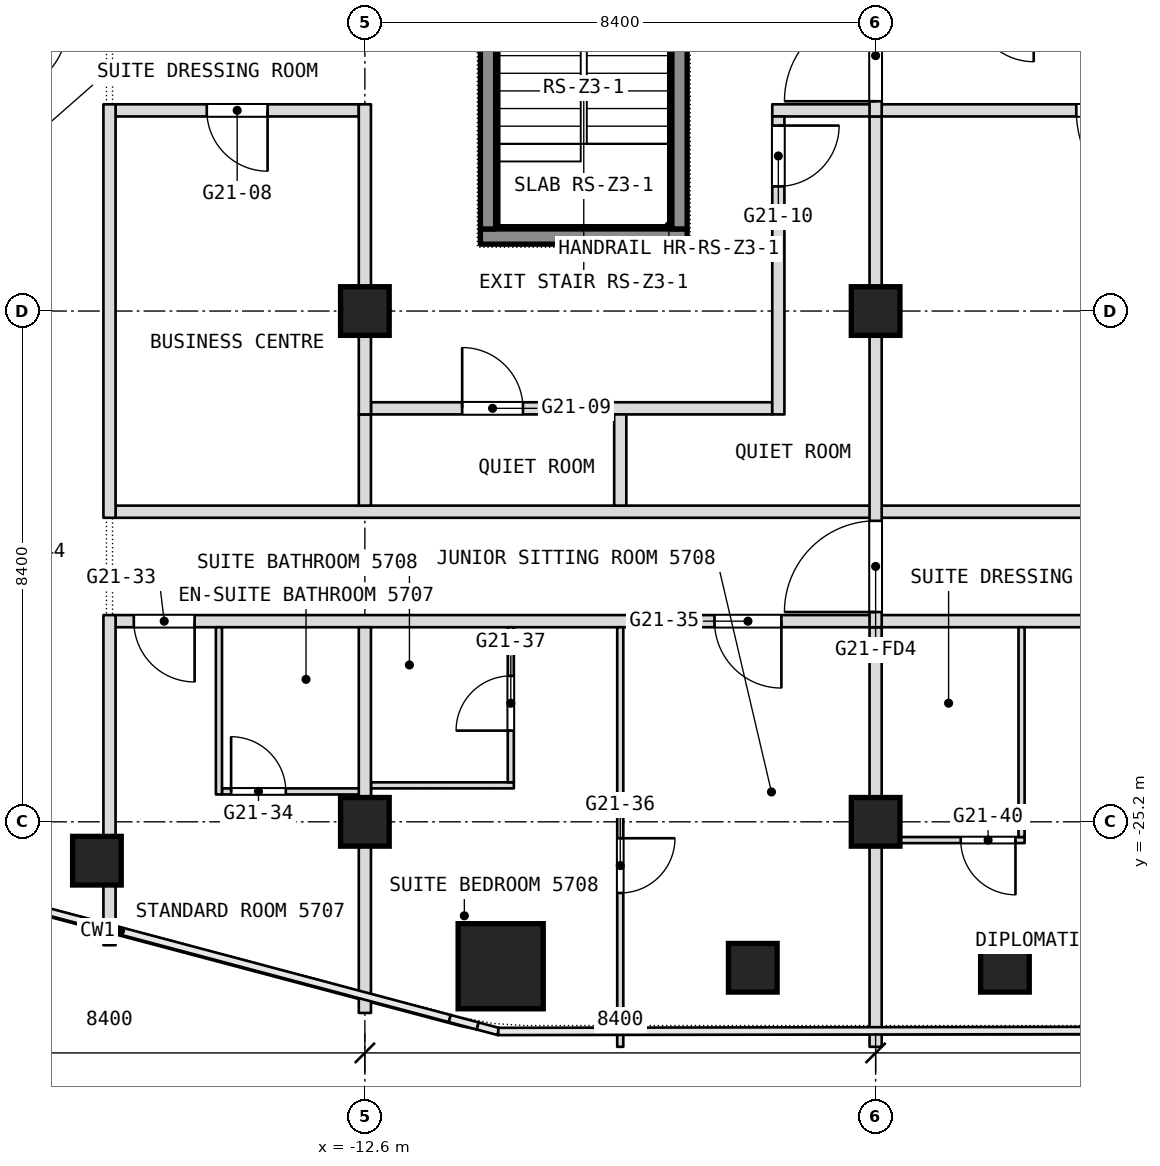
"""IFC4 building model, lengths in metres.
Left out: names, types, materials, properties, quantities, classifications, styles, units other than length and angle.
Written with IfcOpenShell. Run it as: python <this file> out.ifc"""

import sys

from ifc_helpers import new_model, si_unit, direction, frame, frame_2d, origin, origin_2d, place, context, subcontext, project, spatial, rectangle, extrude, element, fill, save


model = new_model("IFC4")
c1 = context("Model", 3, precision=1e-05, world=origin(), true_north=direction((0.0, 1.0)))
c2 = subcontext(c1, "Body", "Model", "MODEL_VIEW")
j1 = project(units=[si_unit("LENGTHUNIT", "METRE"), si_unit("PLANEANGLEUNIT", "RADIAN")], contexts=[c1])
p1 = place(None, origin())
s1 = spatial("IfcSite", under=j1, at=p1, CompositionType="ELEMENT")
p2 = place(p1, origin())
s2 = spatial("IfcBuilding", under=s1, at=p2, CompositionType="ELEMENT")
p3 = place(p2, frame((0.0, 0.0, 241.7)))
s3 = spatial("IfcBuildingStorey", under=s2, at=p3, CompositionType="ELEMENT", Elevation=241.7)
p4 = place(p3, frame((-10.366, -27.575, 0.0), z_axis=(0.0, 0.0, 1.0), x_axis=(1.0, 0.0, 0.0)))
e1 = element("IfcColumn", 1, at=p4, inside=s3, PredefinedType="COLUMN", context=c2, shape_type="SweptSolid", body=[
    extrude(rectangle(XDim=1.4, YDim=1.4, at=origin_2d()), origin(), (0.0, 0.0, 1.0), 3.6),
])
for number, where, z_axis, x_axis in (
    (2, (-12.6, -25.2, 0.0), (0.0, 0.0, 1.0), (1.0, 0.0, 0.0)),
    (3, (-12.6, -16.8, 0.0), (0.0, 0.0, 1.0), (1.0, 0.0, 0.0)),
    (4, (-4.2, -25.2, 0.0), (0.0, 0.0, 1.0), (1.0, 0.0, 0.0)),
    (5, (-4.2, -16.8, 0.0), (0.0, 0.0, 1.0), (1.0, 0.0, 0.0)),
    (6, (-2.073, -27.6, 0.0), (0.0, 0.0, 1.0), (1.0, 0.0, 0.0)),
    (7, (-6.22, -27.6, 0.0), (0.0, 0.0, 1.0), (1.0, 0.0, 0.0)),
    (8, (-17.007, -25.839, 0.0), (0.0, 0.0, 1.0), (1.0, 0.0, 0.0)),
):
    element("IfcColumn", number, at=place(p3, frame(where, z_axis=z_axis, x_axis=x_axis)), inside=s3, PredefinedType="COLUMN", context=c2, shape_type="SweptSolid", body=[
        extrude(rectangle(XDim=0.8, YDim=0.8, at=origin_2d()), origin(), (0.0, 0.0, 1.0), 3.6),
    ])
p5 = place(p3, frame((-4.1, -25.5, 0.0), z_axis=(0.0, 0.0, 1.0), x_axis=(1.0, 0.0, 0.0)))
e9 = element("IfcWall", 9, at=p5, inside=s3, PredefinedType="PARTITIONING", context=c2, shape_type="SweptSolid", body=[
    extrude(rectangle(XDim=2.35, YDim=0.1, at=frame_2d((1.175, 0.0))), origin(), (0.0, 0.0, 1.0), 3.34),
])
p6 = place(p5, frame((1.3, 0.0, 0.0)))
e10 = element("IfcOpeningElement", 10, at=p6, cuts=e9, PredefinedType="OPENING", context=c2, shape_type="SweptSolid", body=[
    extrude(rectangle(XDim=0.9, YDim=2.1, at=frame_2d((0.45, 1.05))), frame((0.0, 0.05, 0.0), z_axis=(0.0, -1.0, 0.0), x_axis=(1.0, 0.0, 0.0)), (0.0, 0.0, 1.0), 0.1),
])
p7 = place(p3, frame((-14.95, -24.7, 0.0), z_axis=(0.0, 0.0, 1.0), x_axis=(1.0, 0.0, 0.0)))
e11 = element("IfcWall", 11, at=p7, inside=s3, PredefinedType="PARTITIONING", context=c2, shape_type="SweptSolid", body=[
    extrude(rectangle(XDim=2.45, YDim=0.1, at=frame_2d((1.225, 0.0))), origin(), (0.0, 0.0, 1.0), 3.34),
])
p8 = place(p7, frame((0.15, 0.0, 0.0)))
e12 = element("IfcOpeningElement", 12, at=p8, cuts=e11, PredefinedType="OPENING", context=c2, shape_type="SweptSolid", body=[
    extrude(rectangle(XDim=0.9, YDim=2.1, at=frame_2d((0.45, 1.05))), frame((0.0, 0.05, 0.0), z_axis=(0.0, -1.0, 0.0), x_axis=(1.0, 0.0, 0.0)), (0.0, 0.0, 1.0), 0.1),
])
p9 = place(p3, frame((-12.5, -24.6, 0.0), z_axis=(0.0, 0.0, 1.0), x_axis=(1.0, 0.0, 0.0)))
e13 = element("IfcWall", 13, at=p9, inside=s3, PredefinedType="PARTITIONING", context=c2, shape_type="SweptSolid", body=[
    extrude(rectangle(XDim=2.35, YDim=0.1, at=frame_2d((1.175, 0.0))), origin(), (0.0, 0.0, 1.0), 3.34),
])
p10 = place(p3, frame((-16.7, -21.9, 0.0), z_axis=(0.0, 0.0, 1.0), x_axis=(1.0, 0.0, 0.0)))
e14 = element("IfcWall", 14, at=p10, inside=s3, PredefinedType="PARTITIONING", context=c2, shape_type="SweptSolid", body=[
    extrude(rectangle(XDim=33.4, YDim=0.2, at=frame_2d((16.7, 0.0))), origin(), (0.0, 0.0, 1.0), 3.34),
])
p11 = place(p10, frame((0.3, 0.0, 0.0)))
e15 = element("IfcOpeningElement", 15, at=p11, cuts=e14, PredefinedType="OPENING", context=c2, shape_type="SweptSolid", body=[
    extrude(rectangle(XDim=1.0, YDim=2.1, at=frame_2d((0.5, 1.05))), frame((0.0, 0.1, 0.0), z_axis=(0.0, -1.0, 0.0), x_axis=(1.0, 0.0, 0.0)), (0.0, 0.0, 1.0), 0.2),
])
p12 = place(p10, frame((9.85, 0.0, 0.0)))
e16 = element("IfcOpeningElement", 16, at=p12, cuts=e14, PredefinedType="OPENING", context=c2, shape_type="SweptSolid", body=[
    extrude(rectangle(XDim=1.1, YDim=2.1, at=frame_2d((0.55, 1.05))), frame((0.0, 0.1, 0.0), z_axis=(0.0, -1.0, 0.0), x_axis=(1.0, 0.0, 0.0)), (0.0, 0.0, 1.0), 0.2),
])
p13 = place(p10, frame((16.1, 0.0, 0.0)))
e17 = element("IfcOpeningElement", 17, at=p13, cuts=e14, PredefinedType="OPENING", context=c2, shape_type="SweptSolid", body=[
    extrude(rectangle(XDim=1.1, YDim=2.1, at=frame_2d((0.55, 1.05))), frame((0.0, 0.1, 0.0), z_axis=(0.0, -1.0, 0.0), x_axis=(1.0, 0.0, 0.0)), (0.0, 0.0, 1.0), 0.2),
])
p14 = place(p10, frame((24.2, 0.0, 0.0)))
e18 = element("IfcOpeningElement", 18, at=p14, cuts=e14, PredefinedType="OPENING", context=c2, shape_type="SweptSolid", body=[
    extrude(rectangle(XDim=1.8, YDim=2.1, at=frame_2d((0.9, 1.05))), frame((0.0, 0.1, 0.0), z_axis=(0.0, -1.0, 0.0), x_axis=(1.0, 0.0, 0.0)), (0.0, 0.0, 1.0), 0.2),
])
p15 = place(p10, frame((29.7, 0.0, 0.0)))
e19 = element("IfcOpeningElement", 19, at=p15, cuts=e14, PredefinedType="OPENING", context=c2, shape_type="SweptSolid", body=[
    extrude(rectangle(XDim=1.0, YDim=2.1, at=frame_2d((0.5, 1.05))), frame((0.0, 0.1, 0.0), z_axis=(0.0, -1.0, 0.0), x_axis=(1.0, 0.0, 0.0)), (0.0, 0.0, 1.0), 0.2),
])
p16 = place(p3, frame((-16.7, -20.1, 0.0), z_axis=(0.0, 0.0, 1.0), x_axis=(1.0, 0.0, 0.0)))
e20 = element("IfcWall", 20, at=p16, inside=s3, PredefinedType="PARTITIONING", context=c2, shape_type="SweptSolid", body=[
    extrude(rectangle(XDim=33.4, YDim=0.2, at=frame_2d((16.7, 0.0))), origin(), (0.0, 0.0, 1.0), 3.34),
])
p17 = place(p3, frame((-12.5, -18.4, 0.0), z_axis=(0.0, 0.0, 1.0), x_axis=(1.0, 0.0, 0.0)))
e21 = element("IfcWall", 21, at=p17, inside=s3, PredefinedType="PARTITIONING", context=c2, shape_type="SweptSolid", body=[
    extrude(rectangle(XDim=6.6, YDim=0.2, at=frame_2d((3.3, 0.0))), origin(), (0.0, 0.0, 1.0), 3.34),
])
p18 = place(p17, frame((1.5, 0.0, 0.0)))
e22 = element("IfcOpeningElement", 22, at=p18, cuts=e21, PredefinedType="OPENING", context=c2, shape_type="SweptSolid", body=[
    extrude(rectangle(XDim=1.0, YDim=2.1, at=frame_2d((0.5, 1.05))), frame((0.0, 0.1, 0.0), z_axis=(0.0, -1.0, 0.0), x_axis=(1.0, 0.0, 0.0)), (0.0, 0.0, 1.0), 0.2),
])
p19 = place(p3, frame((-16.7, -13.5, 0.0), z_axis=(0.0, 0.0, 1.0), x_axis=(1.0, 0.0, 0.0)))
e23 = element("IfcWall", 23, at=p19, inside=s3, PredefinedType="PARTITIONING", context=c2, shape_type="SweptSolid", body=[
    extrude(rectangle(XDim=4.0, YDim=0.2, at=frame_2d((2.0, 0.0))), origin(), (0.0, 0.0, 1.0), 3.34),
])
p20 = place(p19, frame((1.5, 0.0, 0.0)))
e24 = element("IfcOpeningElement", 24, at=p20, cuts=e23, PredefinedType="OPENING", context=c2, shape_type="SweptSolid", body=[
    extrude(rectangle(XDim=1.0, YDim=2.1, at=frame_2d((0.5, 1.05))), frame((0.0, 0.1, 0.0), z_axis=(0.0, -1.0, 0.0), x_axis=(1.0, 0.0, 0.0)), (0.0, 0.0, 1.0), 0.2),
])
p21 = place(p3, frame((-5.9, -13.5, 0.0), z_axis=(0.0, 0.0, 1.0), x_axis=(1.0, 0.0, 0.0)))
e25 = element("IfcWall", 25, at=p21, inside=s3, PredefinedType="PARTITIONING", context=c2, shape_type="SweptSolid", body=[
    extrude(rectangle(XDim=11.6, YDim=0.2, at=frame_2d((5.8, 0.0))), origin(), (0.0, 0.0, 1.0), 3.34),
])
p22 = place(p21, frame((5.0, 0.0, 0.0)))
e26 = element("IfcOpeningElement", 26, at=p22, cuts=e25, PredefinedType="OPENING", context=c2, shape_type="SweptSolid", body=[
    extrude(rectangle(XDim=1.8, YDim=2.1, at=frame_2d((0.9, 1.05))), frame((0.0, 0.1, 0.0), z_axis=(0.0, -1.0, 0.0), x_axis=(1.0, 0.0, 0.0)), (0.0, 0.0, 1.0), 0.2),
])
p23 = place(p3, frame((-1.8, -25.45, 0.0), z_axis=(0.0, 0.0, 1.0), x_axis=(0.0, 1.0, 0.0)))
e27 = element("IfcWall", 27, at=p23, inside=s3, PredefinedType="PARTITIONING", context=c2, shape_type="SweptSolid", body=[
    extrude(rectangle(XDim=3.45, YDim=0.1, at=frame_2d((1.725, 0.0))), origin(), (0.0, 0.0, 1.0), 3.34),
])
p24 = place(p3, frame((-4.2, -28.9, 0.0), z_axis=(0.0, 0.0, 1.0), x_axis=(0.0, 1.0, 0.0)))
e28 = element("IfcWall", 28, at=p24, inside=s3, PredefinedType="PARTITIONING", context=c2, shape_type="SweptSolid", body=[
    extrude(rectangle(XDim=6.9, YDim=0.2, at=frame_2d((3.45, 0.0))), origin(), (0.0, 0.0, 1.0), 3.34),
])
p25 = place(p3, frame((-4.2, -22.0, 0.0), z_axis=(0.0, 0.0, 1.0), x_axis=(0.0, 1.0, 0.0)))
e29 = element("IfcWall", 29, at=p25, inside=s3, PredefinedType="PARTITIONING", context=c2, shape_type="SweptSolid", body=[
    extrude(rectangle(XDim=8.4, YDim=0.2, at=frame_2d((4.2, 0.0))), origin(), (0.0, 0.0, 1.0), 3.34),
])
p26 = place(p25, frame((0.25, 0.0, 0.0)))
e30 = element("IfcOpeningElement", 30, at=p26, cuts=e29, PredefinedType="OPENING", context=c2, shape_type="SweptSolid", body=[
    extrude(rectangle(XDim=1.5, YDim=2.1, at=frame_2d((0.75, 1.05))), frame((0.0, 0.1, 0.0), z_axis=(0.0, -1.0, 0.0), x_axis=(1.0, 0.0, 0.0)), (0.0, 0.0, 1.0), 0.2),
])
p27 = place(p3, frame((-4.2, -13.6, 0.0), z_axis=(0.0, 0.0, 1.0), x_axis=(0.0, 1.0, 0.0)))
e31 = element("IfcWall", 31, at=p27, inside=s3, PredefinedType="PARTITIONING", context=c2, shape_type="SweptSolid", body=[
    extrude(rectangle(XDim=13.6, YDim=0.2, at=frame_2d((6.8, 0.0))), origin(), (0.0, 0.0, 1.0), 3.34),
])
p28 = place(p27, frame((11.95, 0.0, 0.0)))
e32 = element("IfcOpeningElement", 32, at=p28, cuts=e31, PredefinedType="OPENING", context=c2, shape_type="SweptSolid", body=[
    extrude(rectangle(XDim=1.5, YDim=2.1, at=frame_2d((0.75, 1.05))), frame((0.0, 0.1, 0.0), z_axis=(0.0, -1.0, 0.0), x_axis=(1.0, 0.0, 0.0)), (0.0, 0.0, 1.0), 0.2),
])
p29 = place(p27, frame((0.25, 0.0, 0.0)))
e33 = element("IfcOpeningElement", 33, at=p29, cuts=e31, PredefinedType="OPENING", context=c2, shape_type="SweptSolid", body=[
    extrude(rectangle(XDim=1.5, YDim=2.1, at=frame_2d((0.75, 1.05))), frame((0.0, 0.1, 0.0), z_axis=(0.0, -1.0, 0.0), x_axis=(1.0, 0.0, 0.0)), (0.0, 0.0, 1.0), 0.2),
])
p30 = place(p3, frame((-5.8, -18.5, 0.0), z_axis=(0.0, 0.0, 1.0), x_axis=(0.0, 1.0, 0.0)))
e34 = element("IfcWall", 34, at=p30, inside=s3, PredefinedType="PARTITIONING", context=c2, shape_type="SweptSolid", body=[
    extrude(rectangle(XDim=4.9, YDim=0.2, at=frame_2d((2.45, 0.0))), origin(), (0.0, 0.0, 1.0), 3.34),
])
p31 = place(p30, frame((3.75, 0.0, 0.0)))
e35 = element("IfcOpeningElement", 35, at=p31, cuts=e34, PredefinedType="OPENING", context=c2, shape_type="SweptSolid", body=[
    extrude(rectangle(XDim=1.0, YDim=2.1, at=frame_2d((0.5, 1.05))), frame((0.0, 0.1, 0.0), z_axis=(0.0, -1.0, 0.0), x_axis=(1.0, 0.0, 0.0)), (0.0, 0.0, 1.0), 0.2),
])
p32 = place(p3, frame((-8.4, -28.9, 0.0), z_axis=(0.0, 0.0, 1.0), x_axis=(0.0, 1.0, 0.0)))
e36 = element("IfcWall", 36, at=p32, inside=s3, PredefinedType="PARTITIONING", context=c2, shape_type="SweptSolid", body=[
    extrude(rectangle(XDim=6.9, YDim=0.1, at=frame_2d((3.45, 0.0))), origin(), (0.0, 0.0, 1.0), 3.34),
])
p33 = place(p32, frame((2.53, 0.0, 0.0)))
e37 = element("IfcOpeningElement", 37, at=p33, cuts=e36, PredefinedType="OPENING", context=c2, shape_type="SweptSolid", body=[
    extrude(rectangle(XDim=0.9, YDim=2.1, at=frame_2d((0.45, 1.05))), frame((0.0, 0.05, 0.0), z_axis=(0.0, -1.0, 0.0), x_axis=(1.0, 0.0, 0.0)), (0.0, 0.0, 1.0), 0.1),
])
p34 = place(p3, frame((-8.4, -20.0, 0.0), z_axis=(0.0, 0.0, 1.0), x_axis=(0.0, 1.0, 0.0)))
e38 = element("IfcWall", 38, at=p34, inside=s3, PredefinedType="PARTITIONING", context=c2, shape_type="SweptSolid", body=[
    extrude(rectangle(XDim=1.5, YDim=0.2, at=frame_2d((0.75, 0.0))), origin(), (0.0, 0.0, 1.0), 3.34),
])
p35 = place(p3, frame((-10.2, -24.55, 0.0), z_axis=(0.0, 0.0, 1.0), x_axis=(0.0, 1.0, 0.0)))
e39 = element("IfcWall", 39, at=p35, inside=s3, PredefinedType="PARTITIONING", context=c2, shape_type="SweptSolid", body=[
    extrude(rectangle(XDim=2.55, YDim=0.1, at=frame_2d((1.275, 0.0))), origin(), (0.0, 0.0, 1.0), 3.34),
])
p36 = place(p35, frame((0.85, 0.0, 0.0)))
e40 = element("IfcOpeningElement", 40, at=p36, cuts=e39, PredefinedType="OPENING", context=c2, shape_type="SweptSolid", body=[
    extrude(rectangle(XDim=0.9, YDim=2.1, at=frame_2d((0.45, 1.05))), frame((0.0, 0.05, 0.0), z_axis=(0.0, -1.0, 0.0), x_axis=(1.0, 0.0, 0.0)), (0.0, 0.0, 1.0), 0.1),
])
p37 = place(p3, frame((-12.6, -28.343, 0.0), z_axis=(0.0, 0.0, 1.0), x_axis=(0.0, 1.0, 0.0)))
e41 = element("IfcWall", 41, at=p37, inside=s3, PredefinedType="PARTITIONING", context=c2, shape_type="SweptSolid", body=[
    extrude(rectangle(XDim=6.343, YDim=0.2, at=frame_2d((3.171, 0.0))), origin(), (0.0, 0.0, 1.0), 3.34),
])
p38 = place(p3, frame((-12.6, -20.0, 0.0), z_axis=(0.0, 0.0, 1.0), x_axis=(0.0, 1.0, 0.0)))
e42 = element("IfcWall", 42, at=p38, inside=s3, PredefinedType="PARTITIONING", context=c2, shape_type="SweptSolid", body=[
    extrude(rectangle(XDim=1.5, YDim=0.2, at=frame_2d((0.75, 0.0))), origin(), (0.0, 0.0, 1.0), 3.34),
])
p39 = place(p3, frame((-12.6, -18.5, 0.0), z_axis=(0.0, 0.0, 1.0), x_axis=(0.0, 1.0, 0.0)))
e43 = element("IfcWall", 43, at=p39, inside=s3, PredefinedType="PARTITIONING", context=c2, shape_type="SweptSolid", body=[
    extrude(rectangle(XDim=5.1, YDim=0.2, at=frame_2d((2.55, 0.0))), origin(), (0.0, 0.0, 1.0), 3.34),
])
p40 = place(p3, frame((-15.0, -24.75, 0.0), z_axis=(0.0, 0.0, 1.0), x_axis=(0.0, 1.0, 0.0)))
e44 = element("IfcWall", 44, at=p40, inside=s3, PredefinedType="PARTITIONING", context=c2, shape_type="SweptSolid", body=[
    extrude(rectangle(XDim=2.75, YDim=0.1, at=frame_2d((1.375, 0.0))), origin(), (0.0, 0.0, 1.0), 3.34),
])
p41 = place(p3, frame((-16.8, -27.229, 0.0), z_axis=(0.0, 0.0, 1.0), x_axis=(0.0, 1.0, 0.0)))
e45 = element("IfcWall", 45, at=p41, inside=s3, PredefinedType="PARTITIONING", context=c2, shape_type="SweptSolid", body=[
    extrude(rectangle(XDim=5.429, YDim=0.2, at=frame_2d((2.714, 0.0))), origin(), (0.0, 0.0, 1.0), 3.34),
])
p42 = place(p3, frame((-16.8, -20.2, 0.0), z_axis=(0.0, 0.0, 1.0), x_axis=(0.0, 1.0, 0.0)))
e46 = element("IfcWall", 46, at=p42, inside=s3, PredefinedType="PARTITIONING", context=c2, shape_type="SweptSolid", body=[
    extrude(rectangle(XDim=6.8, YDim=0.2, at=frame_2d((3.4, 0.0))), origin(), (0.0, 0.0, 1.0), 3.34),
])
p43 = place(p3, frame((-10.7, -15.575, 0.1), z_axis=(0.0, 0.0, 1.0), x_axis=(1.0, 0.0, 0.0)))
e47 = element("IfcWall", 47, at=p43, inside=s3, PredefinedType="SHEAR", context=c2, shape_type="SweptSolid", body=[
    extrude(rectangle(XDim=3.4, YDim=0.25, at=frame_2d((1.7, 0.0))), origin(), (0.0, 0.0, 1.0), 3.6),
])
for number, where, z_axis, x_axis in (
    (48, (-10.575, -15.45, 0.1), (0.0, 0.0, 1.0), (0.0, 1.0, 0.0)),
    (49, (-7.425, -15.45, 0.1), (0.0, 0.0, 1.0), (0.0, 1.0, 0.0)),
):
    element("IfcWall", number, at=place(p3, frame(where, z_axis=z_axis, x_axis=x_axis)), inside=s3, PredefinedType="SHEAR", context=c2, shape_type="SweptSolid", body=[
        extrude(rectangle(XDim=5.7, YDim=0.25, at=frame_2d((2.85, 0.0))), origin(), (0.0, 0.0, 1.0), 3.6),
    ])
p44 = place(p6, origin())
e50 = element("IfcDoor", 50, at=p44, inside=s3, OperationType="SINGLE_SWING_RIGHT", PredefinedType="DOOR", context=c2, shape_type="SweptSolid", body=[
    extrude(rectangle(XDim=0.9, YDim=2.1, at=frame_2d((0.45, 1.05))), frame((0.0, 0.025, 0.0), z_axis=(0.0, -1.0, 0.0), x_axis=(1.0, 0.0, 0.0)), (0.0, 0.0, 1.0), 0.05),
])
fill(e10, e50)
p45 = place(p8, origin())
e51 = element("IfcDoor", 51, at=p45, inside=s3, OperationType="SINGLE_SWING_LEFT", PredefinedType="DOOR", context=c2, shape_type="SweptSolid", body=[
    extrude(rectangle(XDim=0.9, YDim=2.1, at=frame_2d((0.45, 1.05))), frame((0.0, 0.025, 0.0), z_axis=(0.0, -1.0, 0.0), x_axis=(1.0, 0.0, 0.0)), (0.0, 0.0, 1.0), 0.05),
])
fill(e12, e51)
p46 = place(p11, origin())
e52 = element("IfcDoor", 52, at=p46, inside=s3, OperationType="SINGLE_SWING_RIGHT", PredefinedType="DOOR", context=c2, shape_type="SweptSolid", body=[
    extrude(rectangle(XDim=1.0, YDim=2.1, at=frame_2d((0.5, 1.05))), frame((0.0, 0.025, 0.0), z_axis=(0.0, -1.0, 0.0), x_axis=(1.0, 0.0, 0.0)), (0.0, 0.0, 1.0), 0.05),
])
fill(e15, e52)
p47 = place(p12, origin())
e53 = element("IfcDoor", 53, at=p47, inside=s3, OperationType="SINGLE_SWING_LEFT", PredefinedType="DOOR", context=c2, shape_type="SweptSolid", body=[
    extrude(rectangle(XDim=1.1, YDim=2.1, at=frame_2d((0.55, 1.05))), frame((0.0, 0.025, 0.0), z_axis=(0.0, -1.0, 0.0), x_axis=(1.0, 0.0, 0.0)), (0.0, 0.0, 1.0), 0.05),
])
fill(e16, e53)
p48 = place(p18, origin())
e54 = element("IfcDoor", 54, at=p48, inside=s3, OperationType="SINGLE_SWING_RIGHT", PredefinedType="DOOR", context=c2, shape_type="SweptSolid", body=[
    extrude(rectangle(XDim=1.0, YDim=2.1, at=frame_2d((0.5, 1.05))), frame((0.0, 0.025, 0.0), z_axis=(0.0, -1.0, 0.0), x_axis=(1.0, 0.0, 0.0)), (0.0, 0.0, 1.0), 0.05),
])
fill(e22, e54)
p49 = place(p20, origin())
e55 = element("IfcDoor", 55, at=p49, inside=s3, OperationType="SINGLE_SWING_RIGHT", PredefinedType="DOOR", context=c2, shape_type="SweptSolid", body=[
    extrude(rectangle(XDim=1.0, YDim=2.1, at=frame_2d((0.5, 1.05))), frame((0.0, 0.025, 0.0), z_axis=(0.0, -1.0, 0.0), x_axis=(1.0, 0.0, 0.0)), (0.0, 0.0, 1.0), 0.05),
])
fill(e24, e55)
p50 = place(p22, origin())
e56 = element("IfcDoor", 56, at=p50, inside=s3, OperationType="DOUBLE_DOOR_SINGLE_SWING", PredefinedType="DOOR", context=c2, shape_type="SweptSolid", body=[
    extrude(rectangle(XDim=1.8, YDim=2.1, at=frame_2d((0.9, 1.05))), frame((0.0, 0.025, 0.0), z_axis=(0.0, -1.0, 0.0), x_axis=(1.0, 0.0, 0.0)), (0.0, 0.0, 1.0), 0.05),
])
fill(e26, e56)
p51 = place(p31, origin())
e57 = element("IfcDoor", 57, at=p51, inside=s3, OperationType="SINGLE_SWING_RIGHT", PredefinedType="DOOR", context=c2, shape_type="SweptSolid", body=[
    extrude(rectangle(XDim=1.0, YDim=2.1, at=frame_2d((0.5, 1.05))), frame((0.0, 0.025, 0.0), z_axis=(0.0, -1.0, 0.0), x_axis=(1.0, 0.0, 0.0)), (0.0, 0.0, 1.0), 0.05),
])
fill(e35, e57)
p52 = place(p33, origin())
e58 = element("IfcDoor", 58, at=p52, inside=s3, OperationType="SINGLE_SWING_LEFT", PredefinedType="DOOR", context=c2, shape_type="SweptSolid", body=[
    extrude(rectangle(XDim=0.9, YDim=2.1, at=frame_2d((0.45, 1.05))), frame((0.0, 0.025, 0.0), z_axis=(0.0, -1.0, 0.0), x_axis=(1.0, 0.0, 0.0)), (0.0, 0.0, 1.0), 0.05),
])
fill(e37, e58)
p53 = place(p36, origin())
e59 = element("IfcDoor", 59, at=p53, inside=s3, OperationType="SINGLE_SWING_RIGHT", PredefinedType="DOOR", context=c2, shape_type="SweptSolid", body=[
    extrude(rectangle(XDim=0.9, YDim=2.1, at=frame_2d((0.45, 1.05))), frame((0.0, 0.025, 0.0), z_axis=(0.0, -1.0, 0.0), x_axis=(1.0, 0.0, 0.0)), (0.0, 0.0, 1.0), 0.05),
])
fill(e40, e59)
p54 = place(p29, origin())
e60 = element("IfcDoor", 60, at=p54, inside=s3, OperationType="DOUBLE_DOOR_DOUBLE_SWING", PredefinedType="DOOR", context=c2, shape_type="SweptSolid", body=[
    extrude(rectangle(XDim=1.5, YDim=2.1, at=frame_2d((0.75, 1.05))), frame((0.0, 0.025, 0.0), z_axis=(0.0, -1.0, 0.0), x_axis=(1.0, 0.0, 0.0)), (0.0, 0.0, 1.0), 0.05),
])
fill(e33, e60)
p55 = place(p26, origin())
e61 = element("IfcDoor", 61, at=p55, inside=s3, OperationType="DOUBLE_DOOR_DOUBLE_SWING", PredefinedType="DOOR", context=c2, shape_type="SweptSolid", body=[
    extrude(rectangle(XDim=1.5, YDim=2.1, at=frame_2d((0.75, 1.05))), frame((0.0, 0.025, 0.0), z_axis=(0.0, -1.0, 0.0), x_axis=(1.0, 0.0, 0.0)), (0.0, 0.0, 1.0), 0.05),
])
fill(e30, e61)
save(model, sys.argv[1])
